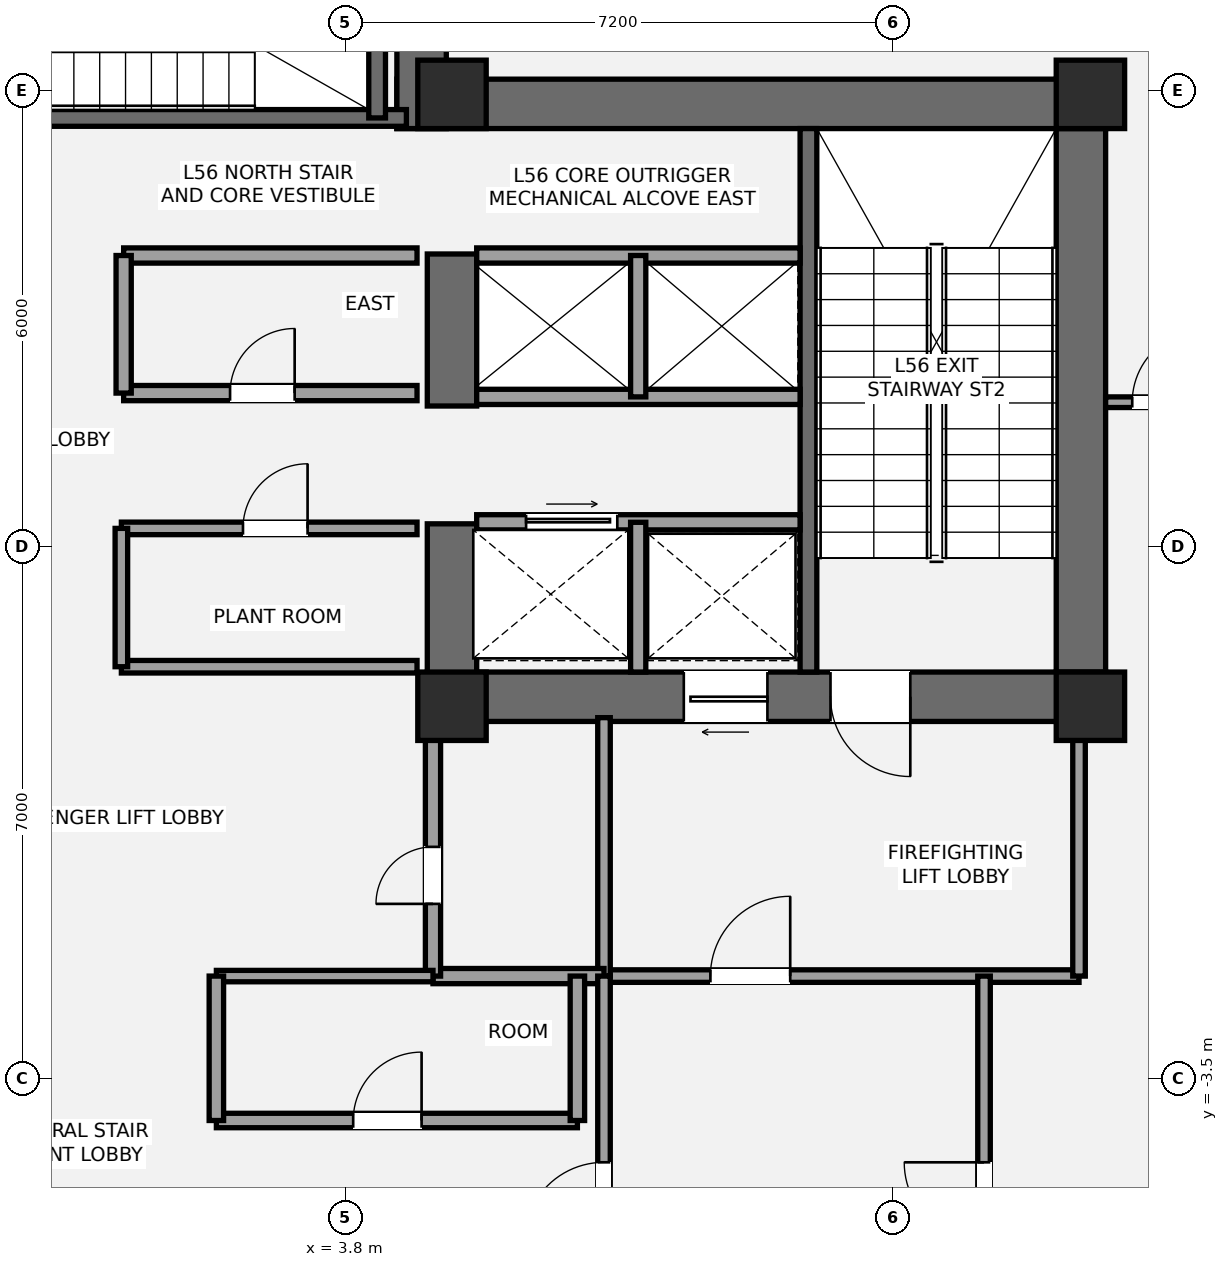
"""IFC4 building model, lengths in metres.
Left out: names, types, materials, properties, quantities, classifications, styles, units other than length and angle.
Written with IfcOpenShell. Run it as: python <this file> out.ifc"""

import sys

from ifc_helpers import new_model, si_unit, direction, frame, frame_2d, origin, origin_2d, place, context, subcontext, project, spatial, rectangle, extrude, element, fill, save


model = new_model("IFC4")
c1 = context("Model", 3, precision=1e-05, world=origin(), true_north=direction((0.0, 1.0)))
c2 = subcontext(c1, "Body", "Model", "MODEL_VIEW")
j1 = project(units=[si_unit("LENGTHUNIT", "METRE"), si_unit("PLANEANGLEUNIT", "RADIAN")], contexts=[c1])
p1 = place(None, origin())
s1 = spatial("IfcSite", under=j1, at=p1, CompositionType="ELEMENT")
p2 = place(p1, origin())
s2 = spatial("IfcBuilding", under=s1, at=p2, CompositionType="ELEMENT")
p3 = place(p2, frame((0.0, 0.0, 201.4)))
s3 = spatial("IfcBuildingStorey", under=s2, at=p3, CompositionType="ELEMENT", Elevation=201.4)
p4 = place(p3, frame((13.475, 1.2, 0.0), z_axis=(0.0, 0.0, 1.0), x_axis=(0.0, 1.0, 0.0)))
e1 = element("IfcWall", 1, at=p4, inside=s3, PredefinedType="SHEAR", context=c2, shape_type="SweptSolid", body=[
    extrude(rectangle(XDim=8.45, YDim=0.65, at=frame_2d((4.225, 0.0))), origin(), (0.0, 0.0, 1.0), 4.5),
])
p5 = place(p3, frame((4.475, 9.325, 0.0), z_axis=(0.0, 0.0, 1.0), x_axis=(1.0, 0.0, 0.0)))
e2 = element("IfcWall", 2, at=p5, inside=s3, PredefinedType="SHEAR", context=c2, shape_type="SweptSolid", body=[
    extrude(rectangle(XDim=9.325, YDim=0.65, at=frame_2d((4.663, 0.0))), origin(), (0.0, 0.0, 1.0), 4.5),
])
p6 = place(p3, frame((13.8, 1.525, 0.0), z_axis=(0.0, 0.0, 1.0), x_axis=(-1.0, 0.0, 0.0)))
e3 = element("IfcWall", 3, at=p6, inside=s3, PredefinedType="SHEAR", context=c2, shape_type="SweptSolid", body=[
    extrude(rectangle(XDim=8.925, YDim=0.65, at=frame_2d((4.462, 0.0))), origin(), (0.0, 0.0, 1.0), 4.5),
])
p7 = place(p6, frame((2.57, 0.0, 0.0)))
e4 = element("IfcOpeningElement", 4, at=p7, cuts=e3, PredefinedType="OPENING", context=c2, shape_type="SweptSolid", body=[
    extrude(rectangle(XDim=1.05, YDim=2.15, at=frame_2d((0.525, 1.075))), frame((0.0, 0.335, 0.0), z_axis=(0.0, -1.0, 0.0), x_axis=(1.0, 0.0, 0.0)), (0.0, 0.0, 1.0), 0.67),
])
p8 = place(p6, frame((4.45, 0.0, 0.0)))
e5 = element("IfcOpeningElement", 5, at=p8, cuts=e3, PredefinedType="OPENING", context=c2, shape_type="SweptSolid", body=[
    extrude(rectangle(XDim=1.1, YDim=2.2, at=frame_2d((0.55, 1.1))), frame((0.0, 0.335, 0.0), z_axis=(0.0, -1.0, 0.0), x_axis=(1.0, 0.0, 0.0)), (0.0, 0.0, 1.0), 0.67),
])
p9 = place(p3, frame((5.2, 1.2, 0.0), z_axis=(0.0, 0.0, 1.0), x_axis=(0.0, 1.0, 0.0)))
e6 = element("IfcWall", 6, at=p9, inside=s3, PredefinedType="SHEAR", context=c2, shape_type="SweptSolid", body=[
    extrude(rectangle(XDim=2.6, YDim=0.65, at=frame_2d((1.3, 0.0))), origin(), (0.0, 0.0, 1.0), 4.5),
])
p10 = place(p3, frame((5.2, 5.35, 0.0), z_axis=(0.0, 0.0, 1.0), x_axis=(0.0, 1.0, 0.0)))
e7 = element("IfcWall", 7, at=p10, inside=s3, PredefinedType="SHEAR", context=c2, shape_type="SweptSolid", body=[
    extrude(rectangle(XDim=2.0, YDim=0.65, at=frame_2d((1.0, 0.0))), origin(), (0.0, 0.0, 1.0), 4.5),
])
p11 = place(p3, frame((9.89, 1.85, 0.0), z_axis=(0.0, 0.0, 1.0), x_axis=(0.0, 1.0, 0.0)))
e8 = element("IfcWall", 8, at=p11, inside=s3, PredefinedType="SHEAR", context=c2, shape_type="SweptSolid", body=[
    extrude(rectangle(XDim=7.15, YDim=0.22, at=frame_2d((3.575, 0.0))), origin(), (0.0, 0.0, 1.0), 4.5),
])
p12 = place(p3, frame((4.8, 9.0, 0.0), z_axis=(0.0, 0.0, 1.0), x_axis=(0.0, 1.0, 0.0)))
e9 = element("IfcWall", 9, at=p12, inside=s3, PredefinedType="SHEAR", context=c2, shape_type="SweptSolid", body=[
    extrude(rectangle(XDim=4.05, YDim=0.65, at=frame_2d((2.025, 0.0))), origin(), (0.0, 0.0, 1.0), 4.5),
])
p13 = place(p3, frame((-4.7, 9.14, 0.0), z_axis=(0.0, 0.0, 1.0), x_axis=(1.0, 0.0, 0.0)))
e10 = element("IfcWall", 10, at=p13, inside=s3, PredefinedType="SHEAR", context=c2, shape_type="SweptSolid", body=[
    extrude(rectangle(XDim=9.3, YDim=0.22, at=frame_2d((4.65, 0.0))), origin(), (0.0, 0.0, 1.0), 4.5),
])
p14 = place(p13, frame((2.23, 0.0, 0.0)))
e11 = element("IfcOpeningElement", 11, at=p14, cuts=e10, PredefinedType="OPENING", context=c2, shape_type="SweptSolid", body=[
    extrude(rectangle(XDim=1.05, YDim=2.15, at=frame_2d((0.525, 1.075))), frame((0.0, 0.12, 0.0), z_axis=(0.0, -1.0, 0.0), x_axis=(1.0, 0.0, 0.0)), (0.0, 0.0, 1.0), 0.24),
])
p15 = place(p3, frame((4.215, 9.14, 0.0), z_axis=(0.0, 0.0, 1.0), x_axis=(0.0, 1.0, 0.0)))
e12 = element("IfcWall", 12, at=p15, inside=s3, PredefinedType="SHEAR", context=c2, shape_type="SweptSolid", body=[
    extrude(rectangle(XDim=3.26, YDim=0.22, at=frame_2d((1.63, 0.0))), origin(), (0.0, 0.0, 1.0), 4.5),
])
for number, where, z_axis, x_axis in (
    (13, (5.2, 1.4, 0.0), (0.0, 0.0, 1.0), (1.0, 0.0, 0.0)),
    (14, (5.2, 9.45, 0.0), (0.0, 0.0, 1.0), (1.0, 0.0, 0.0)),
    (15, (13.6, 1.4, 0.0), (0.0, 0.0, 1.0), (1.0, 0.0, 0.0)),
    (16, (13.6, 9.45, 0.0), (0.0, 0.0, 1.0), (1.0, 0.0, 0.0)),
):
    element("IfcColumn", number, at=place(p3, frame(where, z_axis=z_axis, x_axis=x_axis)), inside=s3, PredefinedType="COLUMN", context=c2, shape_type="SweptSolid", body=[
        extrude(rectangle(XDim=0.9, YDim=0.9, at=origin_2d()), origin(), (0.0, 0.0, 1.0), 4.5),
    ])
p16 = place(p3, frame((7.2, -2.15, 0.0), z_axis=(0.0, 0.0, 1.0), x_axis=(1.0, 0.0, 0.0)))
e17 = element("IfcWall", 17, at=p16, inside=s3, PredefinedType="PARTITIONING", context=c2, shape_type="SweptSolid", body=[
    extrude(rectangle(XDim=6.25, YDim=0.165, at=frame_2d((3.125, 0.0))), origin(), (0.0, 0.0, 1.0), 4.28),
])
p17 = place(p16, frame((1.4, 0.0, 0.0)))
e18 = element("IfcOpeningElement", 18, at=p17, cuts=e17, PredefinedType="OPENING", context=c2, shape_type="SweptSolid", body=[
    extrude(rectangle(XDim=1.05, YDim=2.15, at=frame_2d((0.525, 1.075))), frame((0.0, 0.093, 0.0), z_axis=(0.0, -1.0, 0.0), x_axis=(1.0, 0.0, 0.0)), (0.0, 0.0, 1.0), 0.185),
])
p18 = place(p3, frame((7.2, -2.15, 0.0), z_axis=(0.0, 0.0, 1.0), x_axis=(0.0, 1.0, 0.0)))
e19 = element("IfcWall", 19, at=p18, inside=s3, PredefinedType="PARTITIONING", context=c2, shape_type="SweptSolid", body=[
    extrude(rectangle(XDim=3.4, YDim=0.165, at=frame_2d((1.7, 0.0))), origin(), (0.0, 0.0, 1.0), 4.28),
])
p19 = place(p3, frame((13.45, -2.15, 0.0), z_axis=(0.0, 0.0, 1.0), x_axis=(0.0, 1.0, 0.0)))
e20 = element("IfcWall", 20, at=p19, inside=s3, PredefinedType="PARTITIONING", context=c2, shape_type="SweptSolid", body=[
    extrude(rectangle(XDim=3.4, YDim=0.165, at=frame_2d((1.7, 0.0))), origin(), (0.0, 0.0, 1.0), 2.47),
])
p20 = place(p3, frame((4.95, -2.15, 0.0), z_axis=(0.0, 0.0, 1.0), x_axis=(1.0, 0.0, 0.0)))
e21 = element("IfcWall", 21, at=p20, inside=s3, PredefinedType="SOLIDWALL", context=c2, shape_type="SweptSolid", body=[
    extrude(rectangle(XDim=2.25, YDim=0.2, at=frame_2d((1.125, 0.0))), origin(), (0.0, 0.0, 1.0), 2.47),
])
p21 = place(p3, frame((4.95, -2.15, 0.0), z_axis=(0.0, 0.0, 1.0), x_axis=(0.0, 1.0, 0.0)))
e22 = element("IfcWall", 22, at=p21, inside=s3, PredefinedType="SOLIDWALL", context=c2, shape_type="SweptSolid", body=[
    extrude(rectangle(XDim=3.4, YDim=0.2, at=frame_2d((1.7, 0.0))), origin(), (0.0, 0.0, 1.0), 2.47),
])
p22 = place(p21, frame((0.95, 0.0, 0.0)))
e23 = element("IfcOpeningElement", 23, at=p22, cuts=e22, PredefinedType="OPENING", context=c2, shape_type="SweptSolid", body=[
    extrude(rectangle(XDim=0.75, YDim=2.1, at=frame_2d((0.375, 1.05))), frame((0.0, 0.11, 0.0), z_axis=(0.0, -1.0, 0.0), x_axis=(1.0, 0.0, 0.0)), (0.0, 0.0, 1.0), 0.22),
])
p23 = place(p3, frame((5.525, 3.82, 0.0), z_axis=(0.0, 0.0, 1.0), x_axis=(1.0, 0.0, 0.0)))
e24 = element("IfcWall", 24, at=p23, inside=s3, PredefinedType="SOLIDWALL", context=c2, shape_type="SweptSolid", body=[
    extrude(rectangle(XDim=4.255, YDim=0.2, at=frame_2d((2.127, 0.0))), origin(), (0.0, 0.0, 1.0), 4.28),
])
p24 = place(p23, frame((0.65, 0.0, 0.0)))
e25 = element("IfcOpeningElement", 25, at=p24, cuts=e24, PredefinedType="OPENING", context=c2, shape_type="SweptSolid", body=[
    extrude(rectangle(XDim=1.2, YDim=2.2, at=frame_2d((0.6, 1.1))), frame((0.0, 0.11, 0.0), z_axis=(0.0, -1.0, 0.0), x_axis=(1.0, 0.0, 0.0)), (0.0, 0.0, 1.0), 0.22),
])
p25 = place(p3, frame((7.65, 1.85, 0.0), z_axis=(0.0, 0.0, 1.0), x_axis=(0.0, 1.0, 0.0)))
e26 = element("IfcWall", 26, at=p25, inside=s3, PredefinedType="SOLIDWALL", context=c2, shape_type="SweptSolid", body=[
    extrude(rectangle(XDim=1.97, YDim=0.2, at=frame_2d((0.985, 0.0))), origin(), (0.0, 0.0, 1.0), 4.28),
])
for number, where, z_axis, x_axis in (
    (27, (5.525, 5.47, 0.0), (0.0, 0.0, 1.0), (1.0, 0.0, 0.0)),
    (28, (5.525, 7.33, 0.0), (0.0, 0.0, 1.0), (1.0, 0.0, 0.0)),
):
    element("IfcWall", number, at=place(p3, frame(where, z_axis=z_axis, x_axis=x_axis)), inside=s3, PredefinedType="SOLIDWALL", context=c2, shape_type="SweptSolid", body=[
        extrude(rectangle(XDim=4.255, YDim=0.2, at=frame_2d((2.127, 0.0))), origin(), (0.0, 0.0, 1.0), 4.28),
    ])
p26 = place(p3, frame((7.65, 5.47, 0.0), z_axis=(0.0, 0.0, 1.0), x_axis=(0.0, 1.0, 0.0)))
e29 = element("IfcWall", 29, at=p26, inside=s3, PredefinedType="SOLIDWALL", context=c2, shape_type="SweptSolid", body=[
    extrude(rectangle(XDim=1.86, YDim=0.2, at=frame_2d((0.93, 0.0))), origin(), (0.0, 0.0, 1.0), 4.28),
])
p27 = place(p3, frame((0.85, 1.92, 0.0), z_axis=(0.0, 0.0, 1.0), x_axis=(1.0, 0.0, 0.0)))
e30 = element("IfcWall", 30, at=p27, inside=s3, PredefinedType="PARTITIONING", context=c2, shape_type="SweptSolid", body=[
    extrude(rectangle(XDim=3.89, YDim=0.165, at=frame_2d((1.945, 0.0))), origin(), (0.0, 0.0, 1.0), 3.42),
])
p28 = place(p3, frame((0.85, 3.74, 0.0), z_axis=(0.0, 0.0, 1.0), x_axis=(1.0, 0.0, 0.0)))
e31 = element("IfcWall", 31, at=p28, inside=s3, PredefinedType="PARTITIONING", context=c2, shape_type="SweptSolid", body=[
    extrude(rectangle(XDim=3.89, YDim=0.165, at=frame_2d((1.945, 0.0))), origin(), (0.0, 0.0, 1.0), 4.28),
])
p29 = place(p28, frame((1.6, 0.0, 0.0)))
e32 = element("IfcOpeningElement", 32, at=p29, cuts=e31, PredefinedType="OPENING", context=c2, shape_type="SweptSolid", body=[
    extrude(rectangle(XDim=0.85, YDim=2.1, at=frame_2d((0.425, 1.05))), frame((0.0, 0.093, 0.0), z_axis=(0.0, -1.0, 0.0), x_axis=(1.0, 0.0, 0.0)), (0.0, 0.0, 1.0), 0.185),
])
p30 = place(p3, frame((0.85, 1.92, 0.0), z_axis=(0.0, 0.0, 1.0), x_axis=(0.0, 1.0, 0.0)))
e33 = element("IfcWall", 33, at=p30, inside=s3, PredefinedType="PARTITIONING", context=c2, shape_type="SweptSolid", body=[
    extrude(rectangle(XDim=1.82, YDim=0.165, at=frame_2d((0.91, 0.0))), origin(), (0.0, 0.0, 1.0), 4.28),
])
p31 = place(p3, frame((0.88, 5.52, 0.0), z_axis=(0.0, 0.0, 1.0), x_axis=(1.0, 0.0, 0.0)))
e34 = element("IfcWall", 34, at=p31, inside=s3, PredefinedType="SOLIDWALL", context=c2, shape_type="SweptSolid", body=[
    extrude(rectangle(XDim=3.86, YDim=0.2, at=frame_2d((1.93, 0.0))), origin(), (0.0, 0.0, 1.0), 4.28),
])
p32 = place(p31, frame((1.4, 0.0, 0.0)))
e35 = element("IfcOpeningElement", 35, at=p32, cuts=e34, PredefinedType="OPENING", context=c2, shape_type="SweptSolid", body=[
    extrude(rectangle(XDim=0.85, YDim=2.1, at=frame_2d((0.425, 1.05))), frame((0.0, 0.11, 0.0), z_axis=(0.0, -1.0, 0.0), x_axis=(1.0, 0.0, 0.0)), (0.0, 0.0, 1.0), 0.22),
])
p33 = place(p3, frame((0.88, 7.33, 0.0), z_axis=(0.0, 0.0, 1.0), x_axis=(1.0, 0.0, 0.0)))
e36 = element("IfcWall", 36, at=p33, inside=s3, PredefinedType="SOLIDWALL", context=c2, shape_type="SweptSolid", body=[
    extrude(rectangle(XDim=3.86, YDim=0.2, at=frame_2d((1.93, 0.0))), origin(), (0.0, 0.0, 1.0), 4.28),
])
p34 = place(p3, frame((0.88, 5.52, 0.0), z_axis=(0.0, 0.0, 1.0), x_axis=(0.0, 1.0, 0.0)))
e37 = element("IfcWall", 37, at=p34, inside=s3, PredefinedType="SOLIDWALL", context=c2, shape_type="SweptSolid", body=[
    extrude(rectangle(XDim=1.81, YDim=0.2, at=frame_2d((0.905, 0.0))), origin(), (0.0, 0.0, 1.0), 4.28),
])
p35 = place(p3, frame((2.1, -4.05, 0.0), z_axis=(0.0, 0.0, 1.0), x_axis=(1.0, 0.0, 0.0)))
e38 = element("IfcWall", 38, at=p35, inside=s3, PredefinedType="PLUMBINGWALL", context=c2, shape_type="SweptSolid", body=[
    extrude(rectangle(XDim=4.75, YDim=0.19, at=frame_2d((2.375, 0.0))), origin(), (0.0, 0.0, 1.0), 2.47),
])
p36 = place(p35, frame((1.8, 0.0, 0.0)))
e39 = element("IfcOpeningElement", 39, at=p36, cuts=e38, PredefinedType="OPENING", context=c2, shape_type="SweptSolid", body=[
    extrude(rectangle(XDim=0.9, YDim=2.1, at=frame_2d((0.45, 1.05))), frame((0.0, 0.105, 0.0), z_axis=(0.0, -1.0, 0.0), x_axis=(1.0, 0.0, 0.0)), (0.0, 0.0, 1.0), 0.21),
])
p37 = place(p3, frame((2.1, -2.15, 0.0), z_axis=(0.0, 0.0, 1.0), x_axis=(1.0, 0.0, 0.0)))
e40 = element("IfcWall", 40, at=p37, inside=s3, PredefinedType="PLUMBINGWALL", context=c2, shape_type="SweptSolid", body=[
    extrude(rectangle(XDim=2.85, YDim=0.15, at=frame_2d((1.425, 0.0))), origin(), (0.0, 0.0, 1.0), 3.733),
])
for number, where, z_axis, x_axis in (
    (41, (2.1, -4.05, 0.0), (0.0, 0.0, 1.0), (0.0, 1.0, 0.0)),
    (42, (6.85, -4.05, 0.0), (0.0, 0.0, 1.0), (0.0, 1.0, 0.0)),
):
    element("IfcWall", number, at=place(p3, frame(where, z_axis=z_axis, x_axis=x_axis)), inside=s3, PredefinedType="PLUMBINGWALL", context=c2, shape_type="SweptSolid", body=[
        extrude(rectangle(XDim=1.9, YDim=0.19, at=frame_2d((0.95, 0.0))), origin(), (0.0, 0.0, 1.0), 4.28),
    ])
p38 = place(p3, frame((7.2, -6.85, 0.0), z_axis=(0.0, 0.0, 1.0), x_axis=(0.0, 1.0, 0.0)))
e43 = element("IfcWall", 43, at=p38, inside=s3, PredefinedType="PARTITIONING", context=c2, shape_type="SweptSolid", body=[
    extrude(rectangle(XDim=4.7, YDim=0.165, at=frame_2d((2.35, 0.0))), origin(), (0.0, 0.0, 1.0), 3.733),
])
p39 = place(p38, frame((1.2, 0.0, 0.0)))
e44 = element("IfcOpeningElement", 44, at=p39, cuts=e43, PredefinedType="OPENING", context=c2, shape_type="SweptSolid", body=[
    extrude(rectangle(XDim=1.05, YDim=2.15, at=frame_2d((0.525, 1.075))), frame((0.0, 0.093, 0.0), z_axis=(0.0, -1.0, 0.0), x_axis=(1.0, 0.0, 0.0)), (0.0, 0.0, 1.0), 0.185),
])
p40 = place(p3, frame((12.2, -6.85, 0.0), z_axis=(0.0, 0.0, 1.0), x_axis=(0.0, 1.0, 0.0)))
e45 = element("IfcWall", 45, at=p40, inside=s3, PredefinedType="PARTITIONING", context=c2, shape_type="SweptSolid", body=[
    extrude(rectangle(XDim=4.7, YDim=0.165, at=frame_2d((2.35, 0.0))), origin(), (0.0, 0.0, 1.0), 3.733),
])
p41 = place(p40, frame((1.2, 0.0, 0.0)))
e46 = element("IfcOpeningElement", 46, at=p41, cuts=e45, PredefinedType="OPENING", context=c2, shape_type="SweptSolid", body=[
    extrude(rectangle(XDim=1.05, YDim=2.15, at=frame_2d((0.525, 1.075))), frame((0.0, 0.093, 0.0), z_axis=(0.0, -1.0, 0.0), x_axis=(1.0, 0.0, 0.0)), (0.0, 0.0, 1.0), 0.185),
])
p42 = place(p3, frame((13.8, 5.4, 0.0), z_axis=(0.0, 0.0, 1.0), x_axis=(1.0, 0.0, 0.0)))
e47 = element("IfcWall", 47, at=p42, inside=s3, PredefinedType="PARTITIONING", context=c2, shape_type="SweptSolid", body=[
    extrude(rectangle(XDim=7.475, YDim=0.14, at=frame_2d((3.737, 0.0))), origin(), (0.0, 0.0, 1.0), 4.28),
])
p43 = place(p42, frame((0.35, 0.0, 0.0)))
e48 = element("IfcOpeningElement", 48, at=p43, cuts=e47, PredefinedType="OPENING", context=c2, shape_type="SweptSolid", body=[
    extrude(rectangle(XDim=0.95, YDim=2.15, at=frame_2d((0.475, 1.075))), frame((0.0, 0.08, 0.0), z_axis=(0.0, -1.0, 0.0), x_axis=(1.0, 0.0, 0.0)), (0.0, 0.0, 1.0), 0.16),
])
p44 = place(p7, origin())
e49 = element("IfcDoor", 49, at=p44, inside=s3, OperationType="SINGLE_SWING_LEFT", PredefinedType="DOOR", context=c2, shape_type="SweptSolid", body=[
    extrude(rectangle(XDim=1.05, YDim=2.15, at=frame_2d((0.525, 1.075))), frame((0.0, 0.025, 0.0), z_axis=(0.0, -1.0, 0.0), x_axis=(1.0, 0.0, 0.0)), (0.0, 0.0, 1.0), 0.05),
])
fill(e4, e49)
p45 = place(p22, origin())
e50 = element("IfcDoor", 50, at=p45, inside=s3, OperationType="SINGLE_SWING_LEFT", PredefinedType="DOOR", context=c2, shape_type="SweptSolid", body=[
    extrude(rectangle(XDim=0.75, YDim=2.1, at=frame_2d((0.375, 1.05))), frame((0.0, 0.025, 0.0), z_axis=(0.0, -1.0, 0.0), x_axis=(1.0, 0.0, 0.0)), (0.0, 0.0, 1.0), 0.05),
])
fill(e23, e50)
p46 = place(p8, origin())
e51 = element("IfcDoor", 51, at=p46, inside=s3, OperationType="SLIDING_TO_LEFT", PredefinedType="DOOR", context=c2, shape_type="SweptSolid", body=[
    extrude(rectangle(XDim=1.1, YDim=2.2, at=frame_2d((0.55, 1.1))), frame((0.0, 0.025, 0.0), z_axis=(0.0, -1.0, 0.0), x_axis=(1.0, 0.0, 0.0)), (0.0, 0.0, 1.0), 0.05),
])
fill(e5, e51)
p47 = place(p24, origin())
e52 = element("IfcDoor", 52, at=p47, inside=s3, OperationType="SLIDING_TO_RIGHT", PredefinedType="DOOR", context=c2, shape_type="SweptSolid", body=[
    extrude(rectangle(XDim=1.2, YDim=2.2, at=frame_2d((0.6, 1.1))), frame((0.0, 0.025, 0.0), z_axis=(0.0, -1.0, 0.0), x_axis=(1.0, 0.0, 0.0)), (0.0, 0.0, 1.0), 0.05),
])
fill(e25, e52)
p48 = place(p29, origin())
e53 = element("IfcDoor", 53, at=p48, inside=s3, OperationType="SINGLE_SWING_RIGHT", PredefinedType="DOOR", context=c2, shape_type="SweptSolid", body=[
    extrude(rectangle(XDim=0.85, YDim=2.1, at=frame_2d((0.425, 1.05))), frame((0.0, 0.025, 0.0), z_axis=(0.0, -1.0, 0.0), x_axis=(1.0, 0.0, 0.0)), (0.0, 0.0, 1.0), 0.05),
])
fill(e32, e53)
p49 = place(p32, origin())
e54 = element("IfcDoor", 54, at=p49, inside=s3, OperationType="SINGLE_SWING_RIGHT", PredefinedType="DOOR", context=c2, shape_type="SweptSolid", body=[
    extrude(rectangle(XDim=0.85, YDim=2.1, at=frame_2d((0.425, 1.05))), frame((0.0, 0.025, 0.0), z_axis=(0.0, -1.0, 0.0), x_axis=(1.0, 0.0, 0.0)), (0.0, 0.0, 1.0), 0.05),
])
fill(e35, e54)
p50 = place(p36, origin())
e55 = element("IfcDoor", 55, at=p50, inside=s3, OperationType="SINGLE_SWING_RIGHT", PredefinedType="DOOR", context=c2, shape_type="SweptSolid", body=[
    extrude(rectangle(XDim=0.9, YDim=2.1, at=frame_2d((0.45, 1.05))), frame((0.0, 0.025, 0.0), z_axis=(0.0, -1.0, 0.0), x_axis=(1.0, 0.0, 0.0)), (0.0, 0.0, 1.0), 0.05),
])
fill(e39, e55)
p51 = place(p17, origin())
e56 = element("IfcDoor", 56, at=p51, inside=s3, OperationType="SINGLE_SWING_RIGHT", PredefinedType="DOOR", context=c2, shape_type="SweptSolid", body=[
    extrude(rectangle(XDim=1.05, YDim=2.15, at=frame_2d((0.525, 1.075))), frame((0.0, 0.025, 0.0), z_axis=(0.0, -1.0, 0.0), x_axis=(1.0, 0.0, 0.0)), (0.0, 0.0, 1.0), 0.05),
])
fill(e18, e56)
p52 = place(p39, origin())
e57 = element("IfcDoor", 57, at=p52, inside=s3, OperationType="SINGLE_SWING_LEFT", PredefinedType="DOOR", context=c2, shape_type="SweptSolid", body=[
    extrude(rectangle(XDim=1.05, YDim=2.15, at=frame_2d((0.525, 1.075))), frame((0.0, 0.025, 0.0), z_axis=(0.0, -1.0, 0.0), x_axis=(1.0, 0.0, 0.0)), (0.0, 0.0, 1.0), 0.05),
])
fill(e44, e57)
p53 = place(p41, origin())
e58 = element("IfcDoor", 58, at=p53, inside=s3, OperationType="SINGLE_SWING_RIGHT", PredefinedType="DOOR", context=c2, shape_type="SweptSolid", body=[
    extrude(rectangle(XDim=1.05, YDim=2.15, at=frame_2d((0.525, 1.075))), frame((0.0, 0.025, 0.0), z_axis=(0.0, -1.0, 0.0), x_axis=(1.0, 0.0, 0.0)), (0.0, 0.0, 1.0), 0.05),
])
fill(e46, e58)
p54 = place(p43, origin())
e59 = element("IfcDoor", 59, at=p54, inside=s3, OperationType="SINGLE_SWING_RIGHT", PredefinedType="DOOR", context=c2, shape_type="SweptSolid", body=[
    extrude(rectangle(XDim=0.95, YDim=2.15, at=frame_2d((0.475, 1.075))), frame((0.0, 0.025, 0.0), z_axis=(0.0, -1.0, 0.0), x_axis=(1.0, 0.0, 0.0)), (0.0, 0.0, 1.0), 0.05),
])
fill(e48, e59)
save(model, sys.argv[1])
